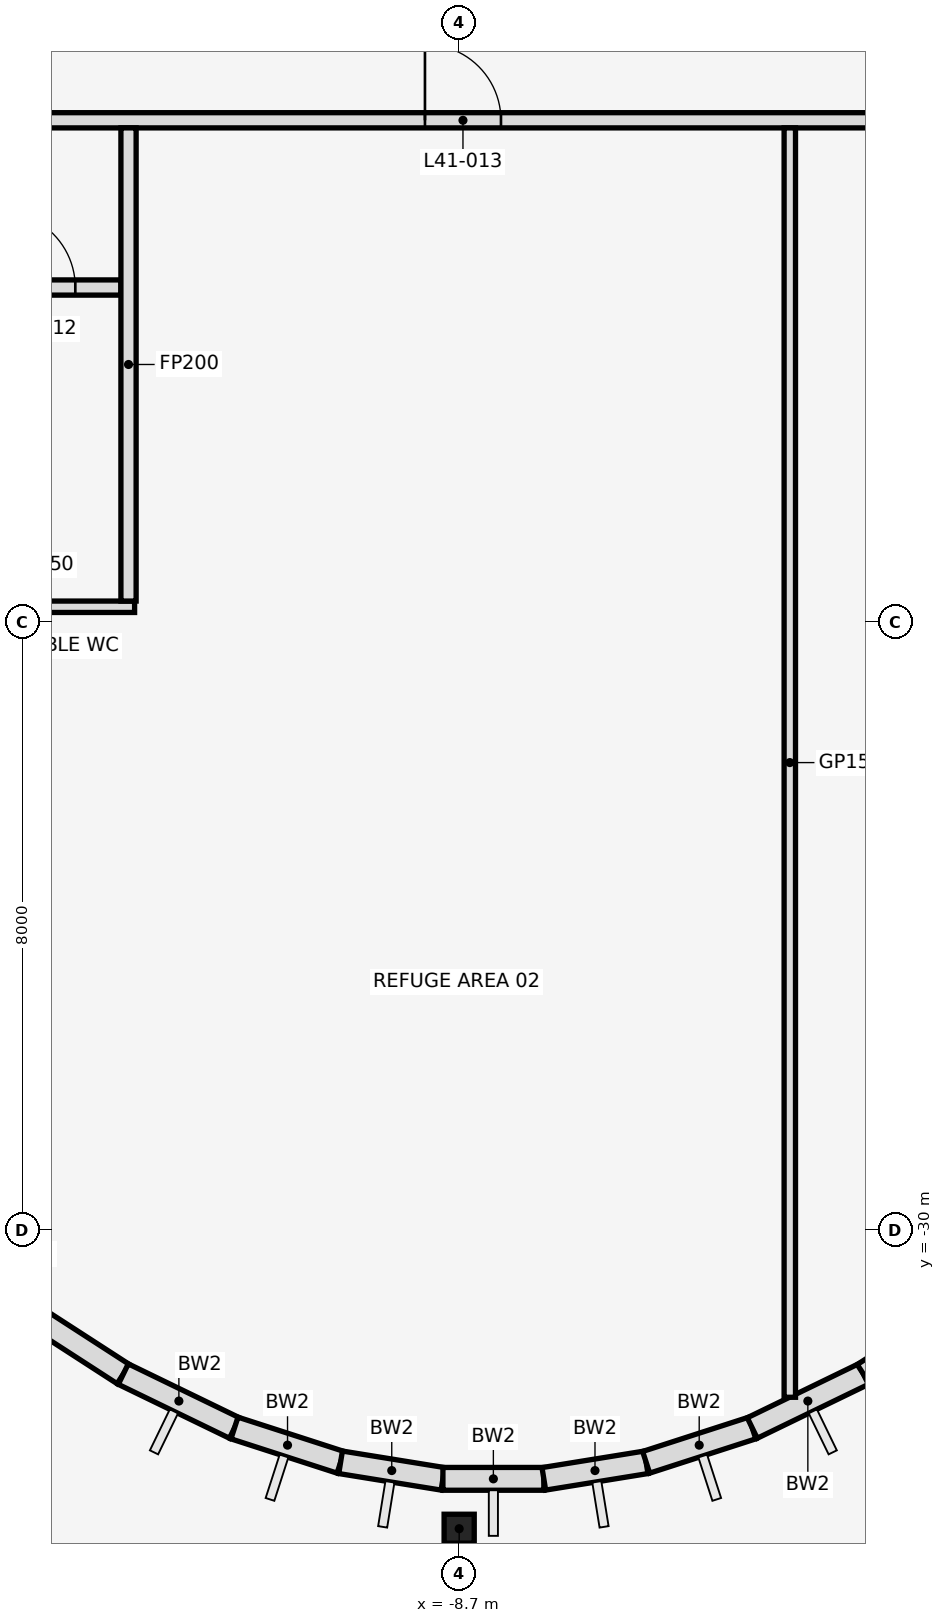
"""IFC4 building model, lengths in metres.
Left out: names, types, materials, properties, quantities, classifications, styles, units other than length and angle.
Written with IfcOpenShell. Run it as: python <this file> out.ifc"""

import sys

from ifc_helpers import new_model, si_unit, direction, frame, frame_2d, origin, origin_2d, place, context, subcontext, project, spatial, rectangle, i_section, extrude, element, fill, save


model = new_model("IFC4")
c1 = context("Model", 3, precision=1e-05, world=origin(), true_north=direction((0.0, 1.0)))
c2 = subcontext(c1, "Body", "Model", "MODEL_VIEW")
j1 = project(units=[si_unit("LENGTHUNIT", "METRE"), si_unit("PLANEANGLEUNIT", "RADIAN")], contexts=[c1])
p1 = place(None, origin())
s1 = spatial("IfcSite", under=j1, at=p1, CompositionType="ELEMENT")
p2 = place(p1, origin())
s2 = spatial("IfcBuilding", under=s1, at=p2, CompositionType="ELEMENT")
p3 = place(p2, frame((0.0, 0.0, 185.5)))
s3 = spatial("IfcBuildingStorey", under=s2, at=p3, CompositionType="ELEMENT", Elevation=185.5)
p4 = place(p3, frame((-8.7, -33.929, 0.0), z_axis=(0.0, 0.0, 1.0), x_axis=(1.0, 0.0, 0.0)))
e1 = element("IfcColumn", 1, at=p4, inside=s3, PredefinedType="COLUMN", context=c2, shape_type="SweptSolid", body=[
    extrude(i_section(OverallWidth=0.396, OverallDepth=0.381, WebThickness=0.019, FlangeThickness=0.03, at=origin_2d()), origin(), (0.0, 0.0, 1.0), 5.4),
])
p5 = place(p3, frame((-15.533, -30.334, 0.0), z_axis=(0.0, 0.0, 1.0), x_axis=(0.839779682339, -0.542927329512, 0.0)))
e2 = element("IfcWall", 2, at=p5, inside=s3, PredefinedType="STANDARD", context=c2, shape_type="SweptSolid", body=[
    extrude(rectangle(XDim=2.875, YDim=0.3, at=frame_2d((1.438, 0.0))), origin(), (0.0, 0.0, 1.0), 4.346),
])
p6 = place(p3, frame((-13.119, -31.895, 0.0), z_axis=(0.0, 0.0, 1.0), x_axis=(0.899798026589, -0.436306671214, 0.0)))
e3 = element("IfcWall", 3, at=p6, inside=s3, PredefinedType="STANDARD", context=c2, shape_type="SweptSolid", body=[
    extrude(rectangle(XDim=1.625, YDim=0.3, at=frame_2d((0.813, 0.0))), origin(), (0.0, 0.0, 1.0), 4.346),
])
p7 = place(p3, frame((-11.656, -32.604, 0.0), z_axis=(0.0, 0.0, 1.0), x_axis=(0.951539081691, -0.307527845919, 0.0)))
e4 = element("IfcWall", 4, at=p7, inside=s3, PredefinedType="STANDARD", context=c2, shape_type="SweptSolid", body=[
    extrude(rectangle(XDim=1.467, YDim=0.3, at=frame_2d((0.733, 0.0))), origin(), (0.0, 0.0, 1.0), 5.25),
])
p8 = place(p3, frame((-10.26, -33.055, 0.0), z_axis=(0.0, 0.0, 1.0), x_axis=(0.987194777017, -0.15951950423, 0.0)))
e5 = element("IfcWall", 5, at=p8, inside=s3, PredefinedType="STANDARD", context=c2, shape_type="SweptSolid", body=[
    extrude(rectangle(XDim=1.364, YDim=0.3, at=frame_2d((0.682, 0.0))), origin(), (0.0, 0.0, 1.0), 4.28),
])
p9 = place(p3, frame((-8.914, -33.273, 0.0), z_axis=(0.0, 0.0, 1.0), x_axis=(1.0, 0.0, 0.0)))
e6 = element("IfcWall", 6, at=p9, inside=s3, PredefinedType="STANDARD", context=c2, shape_type="SweptSolid", body=[
    extrude(rectangle(XDim=1.328, YDim=0.3, at=frame_2d((0.664, 0.0))), origin(), (0.0, 0.0, 1.0), 4.28),
])
p10 = place(p3, frame((-7.586, -33.273, 0.0), z_axis=(0.0, 0.0, 1.0), x_axis=(0.987194777017, 0.15951950423, 0.0)))
e7 = element("IfcWall", 7, at=p10, inside=s3, PredefinedType="STANDARD", context=c2, shape_type="SweptSolid", body=[
    extrude(rectangle(XDim=1.364, YDim=0.3, at=frame_2d((0.682, 0.0))), origin(), (0.0, 0.0, 1.0), 5.25),
])
p11 = place(p3, frame((-6.24, -33.055, 0.0), z_axis=(0.0, 0.0, 1.0), x_axis=(0.951539081691, 0.307527845919, 0.0)))
e8 = element("IfcWall", 8, at=p11, inside=s3, PredefinedType="STANDARD", context=c2, shape_type="SweptSolid", body=[
    extrude(rectangle(XDim=1.467, YDim=0.3, at=frame_2d((0.733, 0.0))), origin(), (0.0, 0.0, 1.0), 5.25),
])
p12 = place(p3, frame((-4.844, -32.604, 0.0), z_axis=(0.0, 0.0, 1.0), x_axis=(0.899798026589, 0.436306671214, 0.0)))
e9 = element("IfcWall", 9, at=p12, inside=s3, PredefinedType="STANDARD", context=c2, shape_type="SweptSolid", body=[
    extrude(rectangle(XDim=1.625, YDim=0.3, at=frame_2d((0.813, 0.0))), origin(), (0.0, 0.0, 1.0), 4.346),
])
p13 = place(p3, frame((-3.381, -31.895, 0.0), z_axis=(0.0, 0.0, 1.0), x_axis=(0.839805110115, 0.542887996759, 0.0)))
e10 = element("IfcWall", 10, at=p13, inside=s3, PredefinedType="STANDARD", context=c2, shape_type="SweptSolid", body=[
    extrude(rectangle(XDim=3.929, YDim=0.3, at=frame_2d((1.965, 0.0))), origin(), (0.0, 0.0, 1.0), 4.414),
])
p14 = place(p3, frame((-15.405, -21.8, 0.0), z_axis=(0.0, 0.0, 1.0), x_axis=(1.0, 0.0, 0.0)))
e11 = element("IfcWall", 11, at=p14, inside=s3, PredefinedType="PARTITIONING", context=c2, shape_type="SweptSolid", body=[
    extrude(rectangle(XDim=2.435, YDim=0.15, at=frame_2d((1.218, 0.0))), origin(), (0.0, 0.0, 1.0), 4.26),
])
p15 = place(p3, frame((-21.65, -17.6, 0.0), z_axis=(0.0, 0.0, 1.0), x_axis=(1.0, 0.0, 0.0)))
e12 = element("IfcWall", 12, at=p15, inside=s3, PredefinedType="PARTITIONING", context=c2, shape_type="SweptSolid", body=[
    extrude(rectangle(XDim=8.5, YDim=0.2, at=frame_2d((4.25, 0.0))), origin(), (0.0, 0.0, 1.0), 4.26),
])
p16 = place(p15, frame((1.1, 0.0, 0.0)))
e13 = element("IfcOpeningElement", 13, at=p16, cuts=e12, PredefinedType="OPENING", context=c2, shape_type="SweptSolid", body=[
    extrude(rectangle(XDim=0.9, YDim=2.1, at=frame_2d((0.45, 1.05))), frame((0.0, 0.112, 0.0), z_axis=(0.0, -1.0, 0.0), x_axis=(1.0, 0.0, 0.0)), (0.0, 0.0, 1.0), 0.224),
])
p17 = place(p15, frame((4.3, 0.0, 0.0)))
e14 = element("IfcOpeningElement", 14, at=p17, cuts=e12, PredefinedType="OPENING", context=c2, shape_type="SweptSolid", body=[
    extrude(rectangle(XDim=0.9, YDim=2.1, at=frame_2d((0.45, 1.05))), frame((0.0, 0.112, 0.0), z_axis=(0.0, -1.0, 0.0), x_axis=(1.0, 0.0, 0.0)), (0.0, 0.0, 1.0), 0.224),
])
p18 = place(p15, frame((6.9, 0.0, 0.0)))
e15 = element("IfcOpeningElement", 15, at=p18, cuts=e12, PredefinedType="OPENING", context=c2, shape_type="SweptSolid", body=[
    extrude(rectangle(XDim=1.0, YDim=2.1, at=frame_2d((0.5, 1.05))), frame((0.0, 0.112, 0.0), z_axis=(0.0, -1.0, 0.0), x_axis=(1.0, 0.0, 0.0)), (0.0, 0.0, 1.0), 0.224),
])
p19 = place(p3, frame((-32.7, -15.4, 0.0), z_axis=(0.0, 0.0, 1.0), x_axis=(1.0, 0.0, 0.0)))
e16 = element("IfcWall", 16, at=p19, inside=s3, PredefinedType="PARTITIONING", context=c2, shape_type="SweptSolid", body=[
    extrude(rectangle(XDim=65.4, YDim=0.2, at=frame_2d((32.7, 0.0))), origin(), (0.0, 0.0, 1.0), 4.26),
])
p20 = place(p19, frame((0.7, 0.0, 0.0)))
e17 = element("IfcOpeningElement", 17, at=p20, cuts=e16, PredefinedType="OPENING", context=c2, shape_type="SweptSolid", body=[
    extrude(rectangle(XDim=0.9, YDim=2.1, at=frame_2d((0.45, 1.05))), frame((0.0, 0.112, 0.0), z_axis=(0.0, -1.0, 0.0), x_axis=(1.0, 0.0, 0.0)), (0.0, 0.0, 1.0), 0.224),
])
p21 = place(p19, frame((5.55, 0.0, 0.0)))
e18 = element("IfcOpeningElement", 18, at=p21, cuts=e16, PredefinedType="OPENING", context=c2, shape_type="SweptSolid", body=[
    extrude(rectangle(XDim=1.0, YDim=2.1, at=frame_2d((0.5, 1.05))), frame((0.0, 0.112, 0.0), z_axis=(0.0, -1.0, 0.0), x_axis=(1.0, 0.0, 0.0)), (0.0, 0.0, 1.0), 0.224),
])
p22 = place(p19, frame((14.85, 0.0, 0.0)))
e19 = element("IfcOpeningElement", 19, at=p22, cuts=e16, PredefinedType="OPENING", context=c2, shape_type="SweptSolid", body=[
    extrude(rectangle(XDim=0.9, YDim=2.1, at=frame_2d((0.45, 1.05))), frame((0.0, 0.112, 0.0), z_axis=(0.0, -1.0, 0.0), x_axis=(1.0, 0.0, 0.0)), (0.0, 0.0, 1.0), 0.224),
])
p23 = place(p19, frame((23.55, 0.0, 0.0)))
e20 = element("IfcOpeningElement", 20, at=p23, cuts=e16, PredefinedType="OPENING", context=c2, shape_type="SweptSolid", body=[
    extrude(rectangle(XDim=1.0, YDim=2.1, at=frame_2d((0.5, 1.05))), frame((0.0, 0.112, 0.0), z_axis=(0.0, -1.0, 0.0), x_axis=(1.0, 0.0, 0.0)), (0.0, 0.0, 1.0), 0.224),
])
p24 = place(p19, frame((32.15, 0.0, 0.0)))
e21 = element("IfcOpeningElement", 21, at=p24, cuts=e16, PredefinedType="OPENING", context=c2, shape_type="SweptSolid", body=[
    extrude(rectangle(XDim=1.0, YDim=2.1, at=frame_2d((0.5, 1.05))), frame((0.0, 0.112, 0.0), z_axis=(0.0, -1.0, 0.0), x_axis=(1.0, 0.0, 0.0)), (0.0, 0.0, 1.0), 0.224),
])
p25 = place(p19, frame((40.95, 0.0, 0.0)))
e22 = element("IfcOpeningElement", 22, at=p25, cuts=e16, PredefinedType="OPENING", context=c2, shape_type="SweptSolid", body=[
    extrude(rectangle(XDim=1.0, YDim=2.1, at=frame_2d((0.5, 1.05))), frame((0.0, 0.112, 0.0), z_axis=(0.0, -1.0, 0.0), x_axis=(1.0, 0.0, 0.0)), (0.0, 0.0, 1.0), 0.224),
])
p26 = place(p19, frame((49.55, 0.0, 0.0)))
e23 = element("IfcOpeningElement", 23, at=p26, cuts=e16, PredefinedType="OPENING", context=c2, shape_type="SweptSolid", body=[
    extrude(rectangle(XDim=1.0, YDim=2.1, at=frame_2d((0.5, 1.05))), frame((0.0, 0.112, 0.0), z_axis=(0.0, -1.0, 0.0), x_axis=(1.0, 0.0, 0.0)), (0.0, 0.0, 1.0), 0.224),
])
p27 = place(p19, frame((58.85, 0.0, 0.0)))
e24 = element("IfcOpeningElement", 24, at=p27, cuts=e16, PredefinedType="OPENING", context=c2, shape_type="SweptSolid", body=[
    extrude(rectangle(XDim=1.0, YDim=2.1, at=frame_2d((0.5, 1.05))), frame((0.0, 0.112, 0.0), z_axis=(0.0, -1.0, 0.0), x_axis=(1.0, 0.0, 0.0)), (0.0, 0.0, 1.0), 0.224),
])
p28 = place(p19, frame((63.85, 0.0, 0.0)))
e25 = element("IfcOpeningElement", 25, at=p28, cuts=e16, PredefinedType="OPENING", context=c2, shape_type="SweptSolid", body=[
    extrude(rectangle(XDim=0.9, YDim=2.1, at=frame_2d((0.45, 1.05))), frame((0.0, 0.112, 0.0), z_axis=(0.0, -1.0, 0.0), x_axis=(1.0, 0.0, 0.0)), (0.0, 0.0, 1.0), 0.224),
])
p29 = place(p3, frame((-13.05, -21.725, 0.0), z_axis=(0.0, 0.0, 1.0), x_axis=(0.0, 1.0, 0.0)))
e26 = element("IfcWall", 26, at=p29, inside=s3, PredefinedType="PARTITIONING", context=c2, shape_type="SweptSolid", body=[
    extrude(rectangle(XDim=6.225, YDim=0.2, at=frame_2d((3.113, 0.0))), origin(), (0.0, 0.0, 1.0), 4.26),
])
p30 = place(p3, frame((-4.35, -32.2, 0.0), z_axis=(0.0, 0.0, 1.0), x_axis=(0.0, 1.0, 0.0)))
e27 = element("IfcWall", 27, at=p30, inside=s3, PredefinedType="PARTITIONING", context=c2, shape_type="SweptSolid", body=[
    extrude(rectangle(XDim=16.7, YDim=0.15, at=frame_2d((8.35, 0.0))), origin(), (0.0, 0.0, 1.0), 4.26),
])
p31 = place(p18, frame((1.0, 0.0, 0.0), z_axis=(0.0, 0.0, 1.0), x_axis=(-1.0, 0.0, 0.0)))
e28 = element("IfcDoor", 28, at=p31, inside=s3, OperationType="SINGLE_SWING_RIGHT", PredefinedType="DOOR", context=c2, shape_type="SweptSolid", body=[
    extrude(rectangle(XDim=1.0, YDim=2.1, at=frame_2d((0.5, 1.05))), frame((0.0, 0.025, 0.0), z_axis=(0.0, -1.0, 0.0), x_axis=(1.0, 0.0, 0.0)), (0.0, 0.0, 1.0), 0.05),
])
fill(e15, e28)
p32 = place(p23, frame((1.0, 0.0, 0.0), z_axis=(0.0, 0.0, 1.0), x_axis=(-1.0, 0.0, 0.0)))
e29 = element("IfcDoor", 29, at=p32, inside=s3, OperationType="SINGLE_SWING_LEFT", PredefinedType="DOOR", context=c2, shape_type="SweptSolid", body=[
    extrude(rectangle(XDim=1.0, YDim=2.1, at=frame_2d((0.5, 1.05))), frame((0.0, 0.025, 0.0), z_axis=(0.0, -1.0, 0.0), x_axis=(1.0, 0.0, 0.0)), (0.0, 0.0, 1.0), 0.05),
])
fill(e20, e29)
save(model, sys.argv[1])
